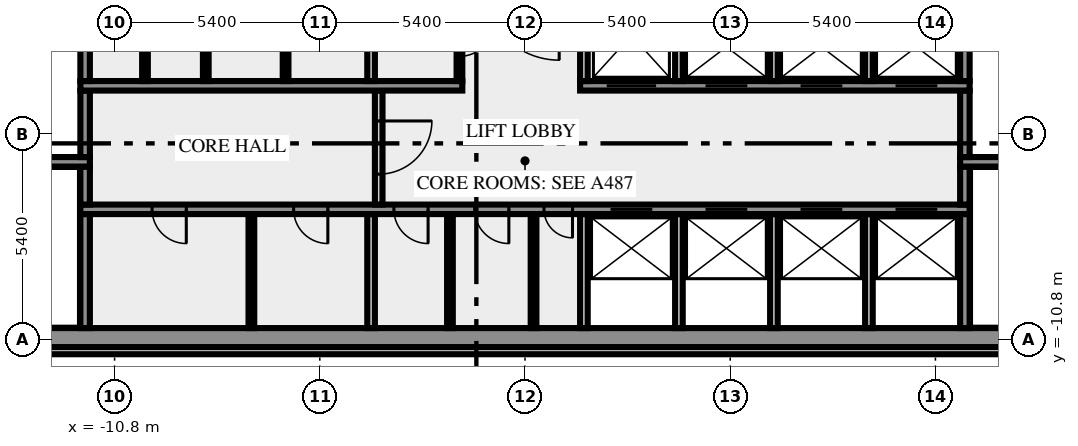
"""IFC4 building model, lengths in metres.
Left out: names, types, materials, properties, quantities, classifications, styles, units other than length and angle.
Written with IfcOpenShell. Run it as: python <this file> out.ifc"""

import sys

from ifc_helpers import new_model, si_unit, direction, frame, frame_2d, origin, place, context, subcontext, project, spatial, rectangle, extrude, element, fill, save


model = new_model("IFC4")
c1 = context("Model", 3, precision=1e-05, world=origin(), true_north=direction((0.0, 1.0)))
c2 = subcontext(c1, "Body", "Model", "MODEL_VIEW")
j1 = project(units=[si_unit("LENGTHUNIT", "METRE"), si_unit("PLANEANGLEUNIT", "RADIAN")], contexts=[c1])
p1 = place(None, origin())
s1 = spatial("IfcSite", under=j1, at=p1, CompositionType="ELEMENT")
p2 = place(p1, origin())
s2 = spatial("IfcBuilding", under=s1, at=p2, CompositionType="ELEMENT")
p3 = place(p2, frame((0.0, 0.0, 180.0)))
s3 = spatial("IfcBuildingStorey", under=s2, at=p3, CompositionType="ELEMENT", Elevation=180.0)
p4 = place(p3, frame((-17.444, -11.088, 0.0), z_axis=(0.0, 0.0, 1.0), x_axis=(1.0, 0.0, 0.0)))
e1 = element("IfcWall", 1, at=p4, inside=s3, PredefinedType="SOLIDWALL", context=c2, shape_type="SweptSolid", body=[
    extrude(rectangle(XDim=34.888, YDim=0.2, at=frame_2d((17.444, 0.0))), origin(), (0.0, 0.0, 1.0), 3.65),
])
p5 = place(p3, frame((-20.0, -10.75, 0.0), z_axis=(0.0, 0.0, 1.0), x_axis=(1.0, 0.0, 0.0)))
e2 = element("IfcWall", 2, at=p5, inside=s3, PredefinedType="SHEAR", context=c2, shape_type="SweptSolid", body=[
    extrude(rectangle(XDim=40.0, YDim=0.5, at=frame_2d((20.0, 0.0))), origin(), (0.0, 0.0, 1.0), 3.65),
])
p6 = place(p5, frame((0.8, 0.0, 1.0)))
e3 = element("IfcOpeningElement", 3, at=p6, cuts=e2, PredefinedType="OPENING", context=c2, shape_type="SweptSolid", body=[
    extrude(rectangle(XDim=1.2, YDim=1.2, at=frame_2d((0.6, 0.6))), frame((0.0, 0.26, 0.0), z_axis=(0.0, -1.0, 0.0), x_axis=(1.0, 0.0, 0.0)), (0.0, 0.0, 1.0), 0.52),
])
p7 = place(p5, frame((38.0, 0.0, 1.0)))
e4 = element("IfcOpeningElement", 4, at=p7, cuts=e2, PredefinedType="OPENING", context=c2, shape_type="SweptSolid", body=[
    extrude(rectangle(XDim=1.2, YDim=1.2, at=frame_2d((0.6, 0.6))), frame((0.0, 0.26, 0.0), z_axis=(0.0, -1.0, 0.0), x_axis=(1.0, 0.0, 0.0)), (0.0, 0.0, 1.0), 0.52),
])
p8 = place(p3, frame((-11.575, -10.5, 0.0), z_axis=(0.0, 0.0, 1.0), x_axis=(0.0, 1.0, 0.0)))
e5 = element("IfcWall", 5, at=p8, inside=s3, PredefinedType="SHEAR", context=c2, shape_type="SweptSolid", body=[
    extrude(rectangle(XDim=3.0, YDim=0.25, at=frame_2d((1.5, 0.0))), origin(), (0.0, 0.0, 1.0), 3.65),
])
p9 = place(p3, frame((-7.2, -10.5, 0.0), z_axis=(0.0, 0.0, 1.0), x_axis=(0.0, 1.0, 0.0)))
e6 = element("IfcWall", 6, at=p9, inside=s3, PredefinedType="PARTITIONING", context=c2, shape_type="SweptSolid", body=[
    extrude(rectangle(XDim=3.0, YDim=0.15, at=frame_2d((1.5, 0.0))), origin(), (0.0, 0.0, 1.0), 3.65),
])
p10 = place(p3, frame((-4.05, -10.5, 0.0), z_axis=(0.0, 0.0, 1.0), x_axis=(0.0, 1.0, 0.0)))
e7 = element("IfcWall", 7, at=p10, inside=s3, PredefinedType="SOLIDWALL", context=c2, shape_type="SweptSolid", body=[
    extrude(rectangle(XDim=3.0, YDim=0.2, at=frame_2d((1.5, 0.0))), origin(), (0.0, 0.0, 1.0), 3.65),
])
for number, where, z_axis, x_axis in (
    (8, (-1.975, -10.5, 0.0), (0.0, 0.0, 1.0), (0.0, 1.0, 0.0)),
    (9, (0.225, -10.5, 0.0), (0.0, 0.0, 1.0), (0.0, 1.0, 0.0)),
):
    element("IfcWall", number, at=place(p3, frame(where, z_axis=z_axis, x_axis=x_axis)), inside=s3, PredefinedType="PARTITIONING", context=c2, shape_type="SweptSolid", body=[
        extrude(rectangle(XDim=3.0, YDim=0.15, at=frame_2d((1.5, 0.0))), origin(), (0.0, 0.0, 1.0), 3.65),
    ])
for number, where, z_axis, x_axis in (
    (10, (1.55, -10.5, 0.0), (0.0, 0.0, 1.0), (0.0, 1.0, 0.0)),
    (11, (4.05, -10.5, 0.0), (0.0, 0.0, 1.0), (0.0, 1.0, 0.0)),
    (12, (6.55, -10.5, 0.0), (0.0, 0.0, 1.0), (0.0, 1.0, 0.0)),
    (13, (9.05, -10.5, 0.0), (0.0, 0.0, 1.0), (0.0, 1.0, 0.0)),
):
    element("IfcWall", number, at=place(p3, frame(where, z_axis=z_axis, x_axis=x_axis)), inside=s3, PredefinedType="SOLIDWALL", context=c2, shape_type="SweptSolid", body=[
        extrude(rectangle(XDim=3.0, YDim=0.2, at=frame_2d((1.5, 0.0))), origin(), (0.0, 0.0, 1.0), 3.65),
    ])
p11 = place(p3, frame((11.575, -10.5, 0.0), z_axis=(0.0, 0.0, 1.0), x_axis=(0.0, 1.0, 0.0)))
e14 = element("IfcWall", 14, at=p11, inside=s3, PredefinedType="SHEAR", context=c2, shape_type="SweptSolid", body=[
    extrude(rectangle(XDim=3.0, YDim=0.25, at=frame_2d((1.5, 0.0))), origin(), (0.0, 0.0, 1.0), 3.65),
])
p12 = place(p3, frame((11.7, -7.375, 0.0), z_axis=(0.0, 0.0, 1.0), x_axis=(-1.0, 0.0, 0.0)))
e15 = element("IfcWall", 15, at=p12, inside=s3, PredefinedType="SHEAR", context=c2, shape_type="SweptSolid", body=[
    extrude(rectangle(XDim=23.4, YDim=0.25, at=frame_2d((11.7, 0.0))), origin(), (0.0, 0.0, 1.0), 3.65),
])
p13 = place(p12, frame((20.613, 0.0, 0.0)))
e16 = element("IfcOpeningElement", 16, at=p13, cuts=e15, PredefinedType="OPENING", context=c2, shape_type="SweptSolid", body=[
    extrude(rectangle(XDim=0.9, YDim=2.1, at=frame_2d((0.45, 1.05))), frame((0.0, 0.135, 0.0), z_axis=(0.0, -1.0, 0.0), x_axis=(1.0, 0.0, 0.0)), (0.0, 0.0, 1.0), 0.27),
])
p14 = place(p12, frame((16.888, 0.0, 0.0)))
e17 = element("IfcOpeningElement", 17, at=p14, cuts=e15, PredefinedType="OPENING", context=c2, shape_type="SweptSolid", body=[
    extrude(rectangle(XDim=0.9, YDim=2.1, at=frame_2d((0.45, 1.05))), frame((0.0, 0.135, 0.0), z_axis=(0.0, -1.0, 0.0), x_axis=(1.0, 0.0, 0.0)), (0.0, 0.0, 1.0), 0.27),
])
p15 = place(p12, frame((14.25, 0.0, 0.0)))
e18 = element("IfcOpeningElement", 18, at=p15, cuts=e15, PredefinedType="OPENING", context=c2, shape_type="SweptSolid", body=[
    extrude(rectangle(XDim=0.9, YDim=2.1, at=frame_2d((0.45, 1.05))), frame((0.0, 0.135, 0.0), z_axis=(0.0, -1.0, 0.0), x_axis=(1.0, 0.0, 0.0)), (0.0, 0.0, 1.0), 0.27),
])
p16 = place(p12, frame((12.125, 0.0, 0.0)))
e19 = element("IfcOpeningElement", 19, at=p16, cuts=e15, PredefinedType="OPENING", context=c2, shape_type="SweptSolid", body=[
    extrude(rectangle(XDim=0.9, YDim=2.1, at=frame_2d((0.45, 1.05))), frame((0.0, 0.135, 0.0), z_axis=(0.0, -1.0, 0.0), x_axis=(1.0, 0.0, 0.0)), (0.0, 0.0, 1.0), 0.27),
])
p17 = place(p12, frame((10.45, 0.0, 0.0)))
e20 = element("IfcOpeningElement", 20, at=p17, cuts=e15, PredefinedType="OPENING", context=c2, shape_type="SweptSolid", body=[
    extrude(rectangle(XDim=0.75, YDim=2.1, at=frame_2d((0.375, 1.05))), frame((0.0, 0.135, 0.0), z_axis=(0.0, -1.0, 0.0), x_axis=(1.0, 0.0, 0.0)), (0.0, 0.0, 1.0), 0.27),
])
p18 = place(p12, frame((8.35, 0.0, 0.0)))
e21 = element("IfcOpeningElement", 21, at=p18, cuts=e15, PredefinedType="OPENING", context=c2, shape_type="SweptSolid", body=[
    extrude(rectangle(XDim=1.1, YDim=2.1, at=frame_2d((0.55, 1.05))), frame((0.0, 0.135, 0.0), z_axis=(0.0, -1.0, 0.0), x_axis=(1.0, 0.0, 0.0)), (0.0, 0.0, 1.0), 0.27),
])
p19 = place(p12, frame((5.85, 0.0, 0.0)))
e22 = element("IfcOpeningElement", 22, at=p19, cuts=e15, PredefinedType="OPENING", context=c2, shape_type="SweptSolid", body=[
    extrude(rectangle(XDim=1.1, YDim=2.1, at=frame_2d((0.55, 1.05))), frame((0.0, 0.135, 0.0), z_axis=(0.0, -1.0, 0.0), x_axis=(1.0, 0.0, 0.0)), (0.0, 0.0, 1.0), 0.27),
])
p20 = place(p12, frame((3.35, 0.0, 0.0)))
e23 = element("IfcOpeningElement", 23, at=p20, cuts=e15, PredefinedType="OPENING", context=c2, shape_type="SweptSolid", body=[
    extrude(rectangle(XDim=1.1, YDim=2.1, at=frame_2d((0.55, 1.05))), frame((0.0, 0.135, 0.0), z_axis=(0.0, -1.0, 0.0), x_axis=(1.0, 0.0, 0.0)), (0.0, 0.0, 1.0), 0.27),
])
p21 = place(p12, frame((0.85, 0.0, 0.0)))
e24 = element("IfcOpeningElement", 24, at=p21, cuts=e15, PredefinedType="OPENING", context=c2, shape_type="SweptSolid", body=[
    extrude(rectangle(XDim=1.1, YDim=2.1, at=frame_2d((0.55, 1.05))), frame((0.0, 0.135, 0.0), z_axis=(0.0, -1.0, 0.0), x_axis=(1.0, 0.0, 0.0)), (0.0, 0.0, 1.0), 0.27),
])
p22 = place(p3, frame((-11.575, -7.25, 0.0), z_axis=(0.0, 0.0, 1.0), x_axis=(0.0, 1.0, 0.0)))
e25 = element("IfcWall", 25, at=p22, inside=s3, PredefinedType="SHEAR", context=c2, shape_type="SweptSolid", body=[
    extrude(rectangle(XDim=1.0, YDim=0.25, at=frame_2d((0.5, 0.0))), origin(), (0.0, 0.0, 1.0), 3.65),
])
p23 = place(p3, frame((-3.85, -4.25, 0.0), z_axis=(0.0, 0.0, 1.0), x_axis=(0.0, -1.0, 0.0)))
e26 = element("IfcWall", 26, at=p23, inside=s3, PredefinedType="SOLIDWALL", context=c2, shape_type="SweptSolid", body=[
    extrude(rectangle(XDim=3.0, YDim=0.2, at=frame_2d((1.5, 0.0))), origin(), (0.0, 0.0, 1.0), 3.65),
])
p24 = place(p23, frame((0.8, 0.0, 0.0)))
e27 = element("IfcOpeningElement", 27, at=p24, cuts=e26, PredefinedType="OPENING", context=c2, shape_type="SweptSolid", body=[
    extrude(rectangle(XDim=1.4, YDim=2.1, at=frame_2d((0.7, 1.05))), frame((0.0, 0.11, 0.0), z_axis=(0.0, -1.0, 0.0), x_axis=(1.0, 0.0, 0.0)), (0.0, 0.0, 1.0), 0.22),
])
p25 = place(p3, frame((11.575, -7.25, 0.0), z_axis=(0.0, 0.0, 1.0), x_axis=(0.0, 1.0, 0.0)))
e28 = element("IfcWall", 28, at=p25, inside=s3, PredefinedType="SHEAR", context=c2, shape_type="SweptSolid", body=[
    extrude(rectangle(XDim=1.0, YDim=0.25, at=frame_2d((0.5, 0.0))), origin(), (0.0, 0.0, 1.0), 3.65),
])
p26 = place(p3, frame((-11.45, -6.125, 0.0), z_axis=(0.0, 0.0, 1.0), x_axis=(-1.0, 0.0, 0.0)))
e29 = element("IfcWall", 29, at=p26, inside=s3, PredefinedType="SHEAR", context=c2, shape_type="SweptSolid", body=[
    extrude(rectangle(XDim=8.05, YDim=0.25, at=frame_2d((4.025, 0.0))), origin(), (0.0, 0.0, 1.0), 3.65),
])
p27 = place(p26, frame((6.2, 0.0, 0.0)))
e30 = element("IfcOpeningElement", 30, at=p27, cuts=e29, PredefinedType="OPENING", context=c2, shape_type="SweptSolid", body=[
    extrude(rectangle(XDim=1.8, YDim=2.1, at=frame_2d((0.9, 1.05))), frame((0.0, 0.135, 0.0), z_axis=(0.0, -1.0, 0.0), x_axis=(1.0, 0.0, 0.0)), (0.0, 0.0, 1.0), 0.27),
])
p28 = place(p3, frame((19.5, -6.125, 0.0), z_axis=(0.0, 0.0, 1.0), x_axis=(-1.0, 0.0, 0.0)))
e31 = element("IfcWall", 31, at=p28, inside=s3, PredefinedType="SHEAR", context=c2, shape_type="SweptSolid", body=[
    extrude(rectangle(XDim=8.05, YDim=0.25, at=frame_2d((4.025, 0.0))), origin(), (0.0, 0.0, 1.0), 3.65),
])
p29 = place(p28, frame((0.05, 0.0, 0.0)))
e32 = element("IfcOpeningElement", 32, at=p29, cuts=e31, PredefinedType="OPENING", context=c2, shape_type="SweptSolid", body=[
    extrude(rectangle(XDim=1.8, YDim=2.1, at=frame_2d((0.9, 1.05))), frame((0.0, 0.135, 0.0), z_axis=(0.0, -1.0, 0.0), x_axis=(1.0, 0.0, 0.0)), (0.0, 0.0, 1.0), 0.27),
])
for number, where, z_axis, x_axis in (
    (33, (-11.575, -6.0, 0.0), (0.0, 0.0, 1.0), (0.0, 1.0, 0.0)),
    (34, (11.575, -6.0, 0.0), (0.0, 0.0, 1.0), (0.0, 1.0, 0.0)),
):
    element("IfcWall", number, at=place(p3, frame(where, z_axis=z_axis, x_axis=x_axis)), inside=s3, PredefinedType="SHEAR", context=c2, shape_type="SweptSolid", body=[
        extrude(rectangle(XDim=1.75, YDim=0.25, at=frame_2d((0.875, 0.0))), origin(), (0.0, 0.0, 1.0), 3.65),
    ])
p30 = place(p3, frame((-11.7, -4.125, 0.0), z_axis=(0.0, 0.0, 1.0), x_axis=(1.0, 0.0, 0.0)))
e35 = element("IfcWall", 35, at=p30, inside=s3, PredefinedType="SHEAR", context=c2, shape_type="SweptSolid", body=[
    extrude(rectangle(XDim=10.05, YDim=0.25, at=frame_2d((5.025, 0.0))), origin(), (0.0, 0.0, 1.0), 3.65),
])
p31 = place(p3, frame((1.45, -4.125, 0.0), z_axis=(0.0, 0.0, 1.0), x_axis=(1.0, 0.0, 0.0)))
e36 = element("IfcWall", 36, at=p31, inside=s3, PredefinedType="SHEAR", context=c2, shape_type="SweptSolid", body=[
    extrude(rectangle(XDim=10.25, YDim=0.25, at=frame_2d((5.125, 0.0))), origin(), (0.0, 0.0, 1.0), 3.65),
])
p32 = place(p31, frame((0.7, 0.0, 0.0)))
e37 = element("IfcOpeningElement", 37, at=p32, cuts=e36, PredefinedType="OPENING", context=c2, shape_type="SweptSolid", body=[
    extrude(rectangle(XDim=1.3, YDim=2.1, at=frame_2d((0.65, 1.05))), frame((0.0, 0.135, 0.0), z_axis=(0.0, -1.0, 0.0), x_axis=(1.0, 0.0, 0.0)), (0.0, 0.0, 1.0), 0.27),
])
p33 = place(p31, frame((3.3, 0.0, 0.0)))
e38 = element("IfcOpeningElement", 38, at=p33, cuts=e36, PredefinedType="OPENING", context=c2, shape_type="SweptSolid", body=[
    extrude(rectangle(XDim=1.1, YDim=2.1, at=frame_2d((0.55, 1.05))), frame((0.0, 0.135, 0.0), z_axis=(0.0, -1.0, 0.0), x_axis=(1.0, 0.0, 0.0)), (0.0, 0.0, 1.0), 0.27),
])
p34 = place(p31, frame((5.8, 0.0, 0.0)))
e39 = element("IfcOpeningElement", 39, at=p34, cuts=e36, PredefinedType="OPENING", context=c2, shape_type="SweptSolid", body=[
    extrude(rectangle(XDim=1.1, YDim=2.1, at=frame_2d((0.55, 1.05))), frame((0.0, 0.135, 0.0), z_axis=(0.0, -1.0, 0.0), x_axis=(1.0, 0.0, 0.0)), (0.0, 0.0, 1.0), 0.27),
])
p35 = place(p31, frame((8.3, 0.0, 0.0)))
e40 = element("IfcOpeningElement", 40, at=p35, cuts=e36, PredefinedType="OPENING", context=c2, shape_type="SweptSolid", body=[
    extrude(rectangle(XDim=1.1, YDim=2.1, at=frame_2d((0.55, 1.05))), frame((0.0, 0.135, 0.0), z_axis=(0.0, -1.0, 0.0), x_axis=(1.0, 0.0, 0.0)), (0.0, 0.0, 1.0), 0.27),
])
p36 = place(p3, frame((-11.575, -4.0, 0.0), z_axis=(0.0, 0.0, 1.0), x_axis=(0.0, 1.0, 0.0)))
e41 = element("IfcWall", 41, at=p36, inside=s3, PredefinedType="SHEAR", context=c2, shape_type="SweptSolid", body=[
    extrude(rectangle(XDim=2.3, YDim=0.25, at=frame_2d((1.15, 0.0))), origin(), (0.0, 0.0, 1.0), 3.65),
])
for number, where, z_axis, x_axis in (
    (42, (-10.0, -4.0, 0.0), (0.0, 0.0, 1.0), (0.0, 1.0, 0.0)),
    (43, (-8.4, -4.0, 0.0), (0.0, 0.0, 1.0), (0.0, 1.0, 0.0)),
    (44, (-6.3, -4.0, 0.0), (0.0, 0.0, 1.0), (0.0, 1.0, 0.0)),
):
    element("IfcWall", number, at=place(p3, frame(where, z_axis=z_axis, x_axis=x_axis)), inside=s3, PredefinedType="PARTITIONING", context=c2, shape_type="SweptSolid", body=[
        extrude(rectangle(XDim=2.3, YDim=0.15, at=frame_2d((1.15, 0.0))), origin(), (0.0, 0.0, 1.0), 3.65),
    ])
p37 = place(p3, frame((-4.05, -4.0, 0.0), z_axis=(0.0, 0.0, 1.0), x_axis=(0.0, 1.0, 0.0)))
e45 = element("IfcWall", 45, at=p37, inside=s3, PredefinedType="SOLIDWALL", context=c2, shape_type="SweptSolid", body=[
    extrude(rectangle(XDim=2.3, YDim=0.2, at=frame_2d((1.15, 0.0))), origin(), (0.0, 0.0, 1.0), 3.65),
])
p38 = place(p3, frame((-1.725, -1.7, 0.0), z_axis=(0.0, 0.0, 1.0), x_axis=(0.0, -1.0, 0.0)))
e46 = element("IfcWall", 46, at=p38, inside=s3, PredefinedType="PARTITIONING", context=c2, shape_type="SweptSolid", body=[
    extrude(rectangle(XDim=2.3, YDim=0.15, at=frame_2d((1.15, 0.0))), origin(), (0.0, 0.0, 1.0), 3.65),
])
p39 = place(p38, frame((0.75, 0.0, 0.0)))
e47 = element("IfcOpeningElement", 47, at=p39, cuts=e46, PredefinedType="OPENING", context=c2, shape_type="SweptSolid", body=[
    extrude(rectangle(XDim=0.9, YDim=2.1, at=frame_2d((0.45, 1.05))), frame((0.0, 0.085, 0.0), z_axis=(0.0, -1.0, 0.0), x_axis=(1.0, 0.0, 0.0)), (0.0, 0.0, 1.0), 0.17),
])
for number, where, z_axis, x_axis in (
    (48, (1.55, -4.0, 0.0), (0.0, 0.0, 1.0), (0.0, 1.0, 0.0)),
    (49, (4.05, -4.0, 0.0), (0.0, 0.0, 1.0), (0.0, 1.0, 0.0)),
    (50, (6.55, -4.0, 0.0), (0.0, 0.0, 1.0), (0.0, 1.0, 0.0)),
    (51, (9.05, -4.0, 0.0), (0.0, 0.0, 1.0), (0.0, 1.0, 0.0)),
):
    element("IfcWall", number, at=place(p3, frame(where, z_axis=z_axis, x_axis=x_axis)), inside=s3, PredefinedType="SOLIDWALL", context=c2, shape_type="SweptSolid", body=[
        extrude(rectangle(XDim=2.3, YDim=0.2, at=frame_2d((1.15, 0.0))), origin(), (0.0, 0.0, 1.0), 3.65),
    ])
p40 = place(p3, frame((11.575, -4.0, 0.0), z_axis=(0.0, 0.0, 1.0), x_axis=(0.0, 1.0, 0.0)))
e52 = element("IfcWall", 52, at=p40, inside=s3, PredefinedType="SHEAR", context=c2, shape_type="SweptSolid", body=[
    extrude(rectangle(XDim=2.3, YDim=0.25, at=frame_2d((1.15, 0.0))), origin(), (0.0, 0.0, 1.0), 3.65),
])
p41 = place(p13, origin())
e53 = element("IfcDoor", 53, at=p41, inside=s3, OperationType="SINGLE_SWING_RIGHT", PredefinedType="DOOR", context=c2, shape_type="SweptSolid", body=[
    extrude(rectangle(XDim=0.9, YDim=2.1, at=frame_2d((0.45, 1.05))), frame((0.0, 0.025, 0.0), z_axis=(0.0, -1.0, 0.0), x_axis=(1.0, 0.0, 0.0)), (0.0, 0.0, 1.0), 0.05),
])
fill(e16, e53)
p42 = place(p14, origin())
e54 = element("IfcDoor", 54, at=p42, inside=s3, OperationType="SINGLE_SWING_RIGHT", PredefinedType="DOOR", context=c2, shape_type="SweptSolid", body=[
    extrude(rectangle(XDim=0.9, YDim=2.1, at=frame_2d((0.45, 1.05))), frame((0.0, 0.025, 0.0), z_axis=(0.0, -1.0, 0.0), x_axis=(1.0, 0.0, 0.0)), (0.0, 0.0, 1.0), 0.05),
])
fill(e17, e54)
p43 = place(p15, origin())
e55 = element("IfcDoor", 55, at=p43, inside=s3, OperationType="SINGLE_SWING_RIGHT", PredefinedType="DOOR", context=c2, shape_type="SweptSolid", body=[
    extrude(rectangle(XDim=0.9, YDim=2.1, at=frame_2d((0.45, 1.05))), frame((0.0, 0.025, 0.0), z_axis=(0.0, -1.0, 0.0), x_axis=(1.0, 0.0, 0.0)), (0.0, 0.0, 1.0), 0.05),
])
fill(e18, e55)
p44 = place(p16, origin())
e56 = element("IfcDoor", 56, at=p44, inside=s3, OperationType="SINGLE_SWING_RIGHT", PredefinedType="DOOR", context=c2, shape_type="SweptSolid", body=[
    extrude(rectangle(XDim=0.9, YDim=2.1, at=frame_2d((0.45, 1.05))), frame((0.0, 0.025, 0.0), z_axis=(0.0, -1.0, 0.0), x_axis=(1.0, 0.0, 0.0)), (0.0, 0.0, 1.0), 0.05),
])
fill(e19, e56)
p45 = place(p17, origin())
e57 = element("IfcDoor", 57, at=p45, inside=s3, OperationType="SINGLE_SWING_LEFT", PredefinedType="DOOR", context=c2, shape_type="SweptSolid", body=[
    extrude(rectangle(XDim=0.75, YDim=2.1, at=frame_2d((0.375, 1.05))), frame((0.0, 0.025, 0.0), z_axis=(0.0, -1.0, 0.0), x_axis=(1.0, 0.0, 0.0)), (0.0, 0.0, 1.0), 0.05),
])
fill(e20, e57)
p46 = place(p18, origin())
e58 = element("IfcDoor", 58, at=p46, inside=s3, OperationType="DOUBLE_DOOR_SLIDING", PredefinedType="DOOR", context=c2, shape_type="SweptSolid", body=[
    extrude(rectangle(XDim=1.1, YDim=2.1, at=frame_2d((0.55, 1.05))), frame((0.0, 0.025, 0.0), z_axis=(0.0, -1.0, 0.0), x_axis=(1.0, 0.0, 0.0)), (0.0, 0.0, 1.0), 0.05),
])
fill(e21, e58)
p47 = place(p19, origin())
e59 = element("IfcDoor", 59, at=p47, inside=s3, OperationType="DOUBLE_DOOR_SLIDING", PredefinedType="DOOR", context=c2, shape_type="SweptSolid", body=[
    extrude(rectangle(XDim=1.1, YDim=2.1, at=frame_2d((0.55, 1.05))), frame((0.0, 0.025, 0.0), z_axis=(0.0, -1.0, 0.0), x_axis=(1.0, 0.0, 0.0)), (0.0, 0.0, 1.0), 0.05),
])
fill(e22, e59)
p48 = place(p20, origin())
e60 = element("IfcDoor", 60, at=p48, inside=s3, OperationType="DOUBLE_DOOR_SLIDING", PredefinedType="DOOR", context=c2, shape_type="SweptSolid", body=[
    extrude(rectangle(XDim=1.1, YDim=2.1, at=frame_2d((0.55, 1.05))), frame((0.0, 0.025, 0.0), z_axis=(0.0, -1.0, 0.0), x_axis=(1.0, 0.0, 0.0)), (0.0, 0.0, 1.0), 0.05),
])
fill(e23, e60)
p49 = place(p21, origin())
e61 = element("IfcDoor", 61, at=p49, inside=s3, OperationType="DOUBLE_DOOR_SLIDING", PredefinedType="DOOR", context=c2, shape_type="SweptSolid", body=[
    extrude(rectangle(XDim=1.1, YDim=2.1, at=frame_2d((0.55, 1.05))), frame((0.0, 0.025, 0.0), z_axis=(0.0, -1.0, 0.0), x_axis=(1.0, 0.0, 0.0)), (0.0, 0.0, 1.0), 0.05),
])
fill(e24, e61)
p50 = place(p24, origin())
e62 = element("IfcDoor", 62, at=p50, inside=s3, OperationType="DOUBLE_DOOR_SINGLE_SWING", PredefinedType="DOOR", context=c2, shape_type="SweptSolid", body=[
    extrude(rectangle(XDim=1.4, YDim=2.1, at=frame_2d((0.7, 1.05))), frame((0.0, 0.025, 0.0), z_axis=(0.0, -1.0, 0.0), x_axis=(1.0, 0.0, 0.0)), (0.0, 0.0, 1.0), 0.05),
])
fill(e27, e62)
p51 = place(p32, origin())
e63 = element("IfcDoor", 63, at=p51, inside=s3, OperationType="DOUBLE_DOOR_SLIDING", PredefinedType="DOOR", context=c2, shape_type="SweptSolid", body=[
    extrude(rectangle(XDim=1.3, YDim=2.1, at=frame_2d((0.65, 1.05))), frame((0.0, 0.025, 0.0), z_axis=(0.0, -1.0, 0.0), x_axis=(1.0, 0.0, 0.0)), (0.0, 0.0, 1.0), 0.05),
])
fill(e37, e63)
p52 = place(p33, origin())
e64 = element("IfcDoor", 64, at=p52, inside=s3, OperationType="DOUBLE_DOOR_SLIDING", PredefinedType="DOOR", context=c2, shape_type="SweptSolid", body=[
    extrude(rectangle(XDim=1.1, YDim=2.1, at=frame_2d((0.55, 1.05))), frame((0.0, 0.025, 0.0), z_axis=(0.0, -1.0, 0.0), x_axis=(1.0, 0.0, 0.0)), (0.0, 0.0, 1.0), 0.05),
])
fill(e38, e64)
p53 = place(p34, origin())
e65 = element("IfcDoor", 65, at=p53, inside=s3, OperationType="DOUBLE_DOOR_SLIDING", PredefinedType="DOOR", context=c2, shape_type="SweptSolid", body=[
    extrude(rectangle(XDim=1.1, YDim=2.1, at=frame_2d((0.55, 1.05))), frame((0.0, 0.025, 0.0), z_axis=(0.0, -1.0, 0.0), x_axis=(1.0, 0.0, 0.0)), (0.0, 0.0, 1.0), 0.05),
])
fill(e39, e65)
p54 = place(p35, origin())
e66 = element("IfcDoor", 66, at=p54, inside=s3, OperationType="DOUBLE_DOOR_SLIDING", PredefinedType="DOOR", context=c2, shape_type="SweptSolid", body=[
    extrude(rectangle(XDim=1.1, YDim=2.1, at=frame_2d((0.55, 1.05))), frame((0.0, 0.025, 0.0), z_axis=(0.0, -1.0, 0.0), x_axis=(1.0, 0.0, 0.0)), (0.0, 0.0, 1.0), 0.05),
])
fill(e40, e66)
p55 = place(p39, origin())
e67 = element("IfcDoor", 67, at=p55, inside=s3, OperationType="SINGLE_SWING_RIGHT", PredefinedType="DOOR", context=c2, shape_type="SweptSolid", body=[
    extrude(rectangle(XDim=0.9, YDim=2.1, at=frame_2d((0.45, 1.05))), frame((0.0, 0.025, 0.0), z_axis=(0.0, -1.0, 0.0), x_axis=(1.0, 0.0, 0.0)), (0.0, 0.0, 1.0), 0.05),
])
fill(e47, e67)
save(model, sys.argv[1])
